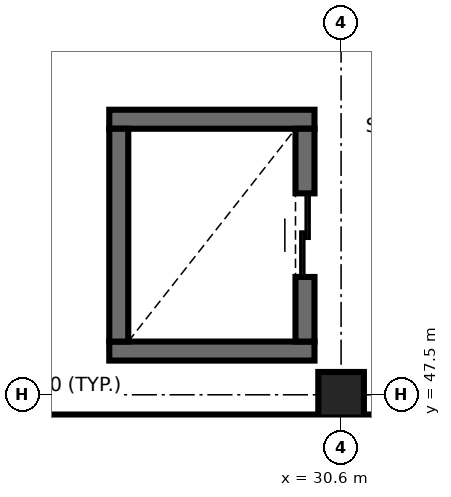
"""IFC4 building model, lengths in metres.
Left out: names, types, materials, properties, quantities, classifications, styles, units other than length and angle.
Written with IfcOpenShell. Run it as: python <this file> out.ifc"""

import sys

from ifc_helpers import new_model, si_unit, direction, frame, frame_2d, origin, origin_2d, place, context, subcontext, project, spatial, rectangle, extrude, element, fill, save


model = new_model("IFC4")
c1 = context("Model", 3, precision=1e-05, world=origin(), true_north=direction((0.0, 1.0)))
c2 = subcontext(c1, "Body", "Model", "MODEL_VIEW")
j1 = project(units=[si_unit("LENGTHUNIT", "METRE"), si_unit("PLANEANGLEUNIT", "RADIAN")], contexts=[c1])
p1 = place(None, origin())
s1 = spatial("IfcSite", under=j1, at=p1, CompositionType="ELEMENT")
p2 = place(p1, origin())
s2 = spatial("IfcBuilding", under=s1, at=p2, CompositionType="ELEMENT")
p3 = place(p2, frame((0.0, 0.0, 9.3)))
s3 = spatial("IfcBuildingStorey", under=s2, at=p3, CompositionType="ELEMENT", Elevation=9.3)
p4 = place(p3, frame((30.6, 47.5, 0.0), z_axis=(0.0, 0.0, 1.0), x_axis=(1.0, 0.0, 0.0)))
e1 = element("IfcColumn", 1, at=p4, inside=s3, PredefinedType="COLUMN", context=c2, shape_type="SweptSolid", body=[
    extrude(rectangle(XDim=0.6, YDim=0.6, at=origin_2d()), origin(), (0.0, 0.0, 1.0), 4.5),
])
for number, where, z_axis, x_axis in (
    (2, (27.55, 48.075, 0.0), (0.0, 0.0, 1.0), (1.0, 0.0, 0.0)),
    (3, (30.25, 51.125, 0.0), (0.0, 0.0, 1.0), (-1.0, 0.0, 0.0)),
):
    element("IfcWall", number, at=place(p3, frame(where, z_axis=z_axis, x_axis=x_axis)), inside=s3, PredefinedType="SHEAR", context=c2, shape_type="SweptSolid", body=[
        extrude(rectangle(XDim=2.7, YDim=0.25, at=frame_2d((1.35, 0.0))), origin(), (0.0, 0.0, 1.0), 4.5),
    ])
p5 = place(p3, frame((27.675, 51.0, 0.0), z_axis=(0.0, 0.0, 1.0), x_axis=(0.0, -1.0, 0.0)))
e4 = element("IfcWall", 4, at=p5, inside=s3, PredefinedType="SHEAR", context=c2, shape_type="SweptSolid", body=[
    extrude(rectangle(XDim=2.8, YDim=0.25, at=frame_2d((1.4, 0.0))), origin(), (0.0, 0.0, 1.0), 4.5),
])
p6 = place(p3, frame((30.125, 48.2, 0.0), z_axis=(0.0, 0.0, 1.0), x_axis=(0.0, 1.0, 0.0)))
e5 = element("IfcWall", 5, at=p6, inside=s3, PredefinedType="SHEAR", context=c2, shape_type="SweptSolid", body=[
    extrude(rectangle(XDim=2.8, YDim=0.25, at=frame_2d((1.4, 0.0))), origin(), (0.0, 0.0, 1.0), 4.5),
])
p7 = place(p6, frame((0.85, 0.0, 0.0)))
e6 = element("IfcOpeningElement", 6, at=p7, cuts=e5, PredefinedType="OPENING", context=c2, shape_type="SweptSolid", body=[
    extrude(rectangle(XDim=1.1, YDim=2.15, at=frame_2d((0.55, 1.075))), frame((0.0, 0.135, 0.0), z_axis=(0.0, -1.0, 0.0), x_axis=(1.0, 0.0, 0.0)), (0.0, 0.0, 1.0), 0.27),
])
p8 = place(p3, frame((5.922, 47.07, 0.0), z_axis=(0.0, 0.0, 1.0), x_axis=(1.0, 0.0, 0.0)))
e7 = element("IfcWall", 7, at=p8, inside=s3, PredefinedType="SOLIDWALL", context=c2, shape_type="SweptSolid", body=[
    extrude(rectangle(XDim=41.478, YDim=0.34, at=frame_2d((20.739, 0.0))), origin(), (0.0, 0.0, 1.0), 4.25),
])
p9 = place(p8, frame((33.878, 0.0, 0.0)))
e8 = element("IfcOpeningElement", 8, at=p9, cuts=e7, PredefinedType="OPENING", context=c2, shape_type="SweptSolid", body=[
    extrude(rectangle(XDim=1.6, YDim=2.2, at=frame_2d((0.8, 1.1))), frame((0.0, 0.18, 0.0), z_axis=(0.0, -1.0, 0.0), x_axis=(1.0, 0.0, 0.0)), (0.0, 0.0, 1.0), 0.36),
])
p10 = place(p8, frame((3.768, 0.0, 0.9)))
e9 = element("IfcOpeningElement", 9, at=p10, cuts=e7, PredefinedType="OPENING", context=c2, shape_type="SweptSolid", body=[
    extrude(rectangle(XDim=1.8, YDim=2.1, at=frame_2d((0.9, 1.05))), frame((0.0, 0.18, 0.0), z_axis=(0.0, -1.0, 0.0), x_axis=(1.0, 0.0, 0.0)), (0.0, 0.0, 1.0), 0.36),
])
p11 = place(p8, frame((25.608, 0.0, 0.9)))
e10 = element("IfcOpeningElement", 10, at=p11, cuts=e7, PredefinedType="OPENING", context=c2, shape_type="SweptSolid", body=[
    extrude(rectangle(XDim=1.8, YDim=2.1, at=frame_2d((0.9, 1.05))), frame((0.0, 0.18, 0.0), z_axis=(0.0, -1.0, 0.0), x_axis=(1.0, 0.0, 0.0)), (0.0, 0.0, 1.0), 0.36),
])
p12 = place(p8, frame((28.808, 0.0, 0.9)))
e11 = element("IfcOpeningElement", 11, at=p12, cuts=e7, PredefinedType="OPENING", context=c2, shape_type="SweptSolid", body=[
    extrude(rectangle(XDim=3.0, YDim=2.1, at=frame_2d((1.5, 1.05))), frame((0.0, 0.18, 0.0), z_axis=(0.0, -1.0, 0.0), x_axis=(1.0, 0.0, 0.0)), (0.0, 0.0, 1.0), 0.36),
])
p13 = place(p8, frame((37.928, 0.0, 0.9)))
e12 = element("IfcOpeningElement", 12, at=p13, cuts=e7, PredefinedType="OPENING", context=c2, shape_type="SweptSolid", body=[
    extrude(rectangle(XDim=1.5, YDim=1.5, at=frame_2d((0.75, 0.75))), frame((0.0, 0.18, 0.0), z_axis=(0.0, -1.0, 0.0), x_axis=(1.0, 0.0, 0.0)), (0.0, 0.0, 1.0), 0.36),
])
p14 = place(p7, origin())
e13 = element("IfcDoor", 13, at=p14, inside=s3, OperationType="DOUBLE_DOOR_SLIDING", PredefinedType="DOOR", context=c2, shape_type="SweptSolid", body=[
    extrude(rectangle(XDim=1.1, YDim=2.15, at=frame_2d((0.55, 1.075))), frame((0.0, 0.025, 0.0), z_axis=(0.0, -1.0, 0.0), x_axis=(1.0, 0.0, 0.0)), (0.0, 0.0, 1.0), 0.05),
])
fill(e6, e13)
save(model, sys.argv[1])
